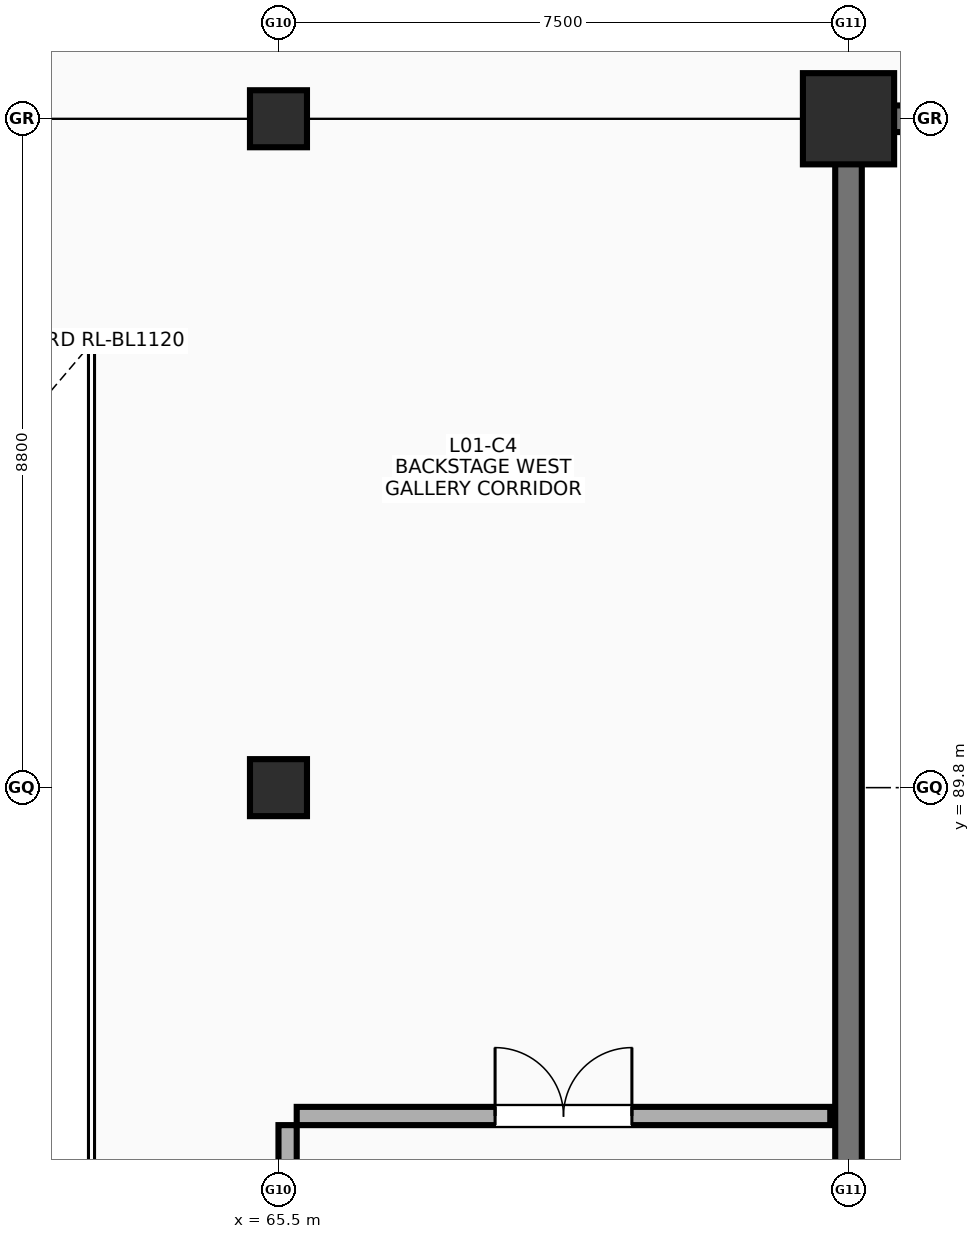
"""IFC4 building model, lengths in metres.
Left out: names, types, materials, properties, quantities, classifications, styles, units other than length and angle.
Written with IfcOpenShell. Run it as: python <this file> out.ifc"""

import sys

from ifc_helpers import new_model, si_unit, direction, frame, frame_2d, origin, origin_2d, place, context, subcontext, project, spatial, rectangle, extrude, element, fill, save


model = new_model("IFC4")
c1 = context("Model", 3, precision=1e-05, world=origin(), true_north=direction((0.0, 1.0)))
c2 = subcontext(c1, "Body", "Model", "MODEL_VIEW")
j1 = project(units=[si_unit("LENGTHUNIT", "METRE"), si_unit("PLANEANGLEUNIT", "RADIAN")], contexts=[c1])
p1 = place(None, origin())
s1 = spatial("IfcSite", under=j1, at=p1, CompositionType="ELEMENT")
p2 = place(p1, origin())
s2 = spatial("IfcBuilding", under=s1, at=p2, CompositionType="ELEMENT")
p3 = place(p2, frame((0.0, 0.0, 5.4)))
s3 = spatial("IfcBuildingStorey", under=s2, at=p3, CompositionType="ELEMENT", Elevation=5.4)
for number, where, z_axis, x_axis in (
    (1, (65.5, 89.8, 0.0), (0.0, 0.0, 1.0), (1.0, 0.0, 0.0)),
    (2, (65.5, 98.6, 0.0), (0.0, 0.0, 1.0), (1.0, 0.0, 0.0)),
):
    element("IfcColumn", number, at=place(p3, frame(where, z_axis=z_axis, x_axis=x_axis)), inside=s3, PredefinedType="COLUMN", context=c2, shape_type="SweptSolid", body=[
        extrude(rectangle(XDim=0.75, YDim=0.75, at=origin_2d()), origin(), (0.0, 0.0, 1.0), 4.4),
    ])
p4 = place(p3, frame((73.0, 98.6, 0.0), z_axis=(0.0, 0.0, 1.0), x_axis=(1.0, 0.0, 0.0)))
e3 = element("IfcColumn", 3, at=p4, inside=s3, PredefinedType="COLUMN", context=c2, shape_type="SweptSolid", body=[
    extrude(rectangle(XDim=1.2, YDim=1.2, at=origin_2d()), origin(), (0.0, 0.0, 1.0), 4.4),
])
p5 = place(p3, frame((73.0, 73.19, 0.0), z_axis=(0.0, 0.0, 1.0), x_axis=(0.0, 1.0, 0.0)))
e4 = element("IfcWall", 4, at=p5, inside=s3, PredefinedType="SHEAR", context=c2, shape_type="SweptSolid", body=[
    extrude(rectangle(XDim=24.82, YDim=0.35, at=frame_2d((12.41, 0.0))), origin(), (0.0, 0.0, 1.0), 4.4),
])
p6 = place(p3, frame((73.59, 98.6, 0.0), z_axis=(0.0, 0.0, 1.0), x_axis=(1.0, 0.0, 0.0)))
e5 = element("IfcWall", 5, at=p6, inside=s3, PredefinedType="SHEAR", context=c2, shape_type="SweptSolid", body=[
    extrude(rectangle(XDim=28.82, YDim=0.35, at=frame_2d((14.41, 0.0))), origin(), (0.0, 0.0, 1.0), 4.4),
])
p7 = place(p3, frame((65.74, 85.48, 0.0), z_axis=(0.0, 0.0, 1.0), x_axis=(1.0, 0.0, 0.0)))
e6 = element("IfcWall", 6, at=p7, inside=s3, PredefinedType="SOLIDWALL", context=c2, shape_type="SweptSolid", body=[
    extrude(rectangle(XDim=7.02, YDim=0.24, at=frame_2d((3.51, 0.0))), origin(), (0.0, 0.0, 1.0), 3.3),
])
p8 = place(p7, frame((2.61, 0.0, 0.0)))
e7 = element("IfcOpeningElement", 7, at=p8, cuts=e6, PredefinedType="OPENING", context=c2, shape_type="SweptSolid", body=[
    extrude(rectangle(XDim=1.8, YDim=2.18, at=frame_2d((0.9, 1.09))), frame((0.0, 0.13, 0.0), z_axis=(0.0, -1.0, 0.0), x_axis=(1.0, 0.0, 0.0)), (0.0, 0.0, 1.0), 0.26),
])
p9 = place(p3, frame((65.62, 81.55, 0.0), z_axis=(0.0, 0.0, 1.0), x_axis=(0.0, 1.0, 0.0)))
e8 = element("IfcWall", 8, at=p9, inside=s3, PredefinedType="SOLIDWALL", context=c2, shape_type="SweptSolid", body=[
    extrude(rectangle(XDim=3.81, YDim=0.24, at=frame_2d((1.905, 0.0))), origin(), (0.0, 0.0, 1.0), 3.3),
])
p10 = place(p8, origin())
e9 = element("IfcDoor", 9, at=p10, inside=s3, OperationType="DOUBLE_DOOR_SINGLE_SWING", PredefinedType="DOOR", context=c2, shape_type="SweptSolid", body=[
    extrude(rectangle(XDim=1.8, YDim=2.18, at=frame_2d((0.9, 1.09))), frame((0.0, 0.025, 0.0), z_axis=(0.0, -1.0, 0.0), x_axis=(1.0, 0.0, 0.0)), (0.0, 0.0, 1.0), 0.05),
])
fill(e7, e9)
save(model, sys.argv[1])
